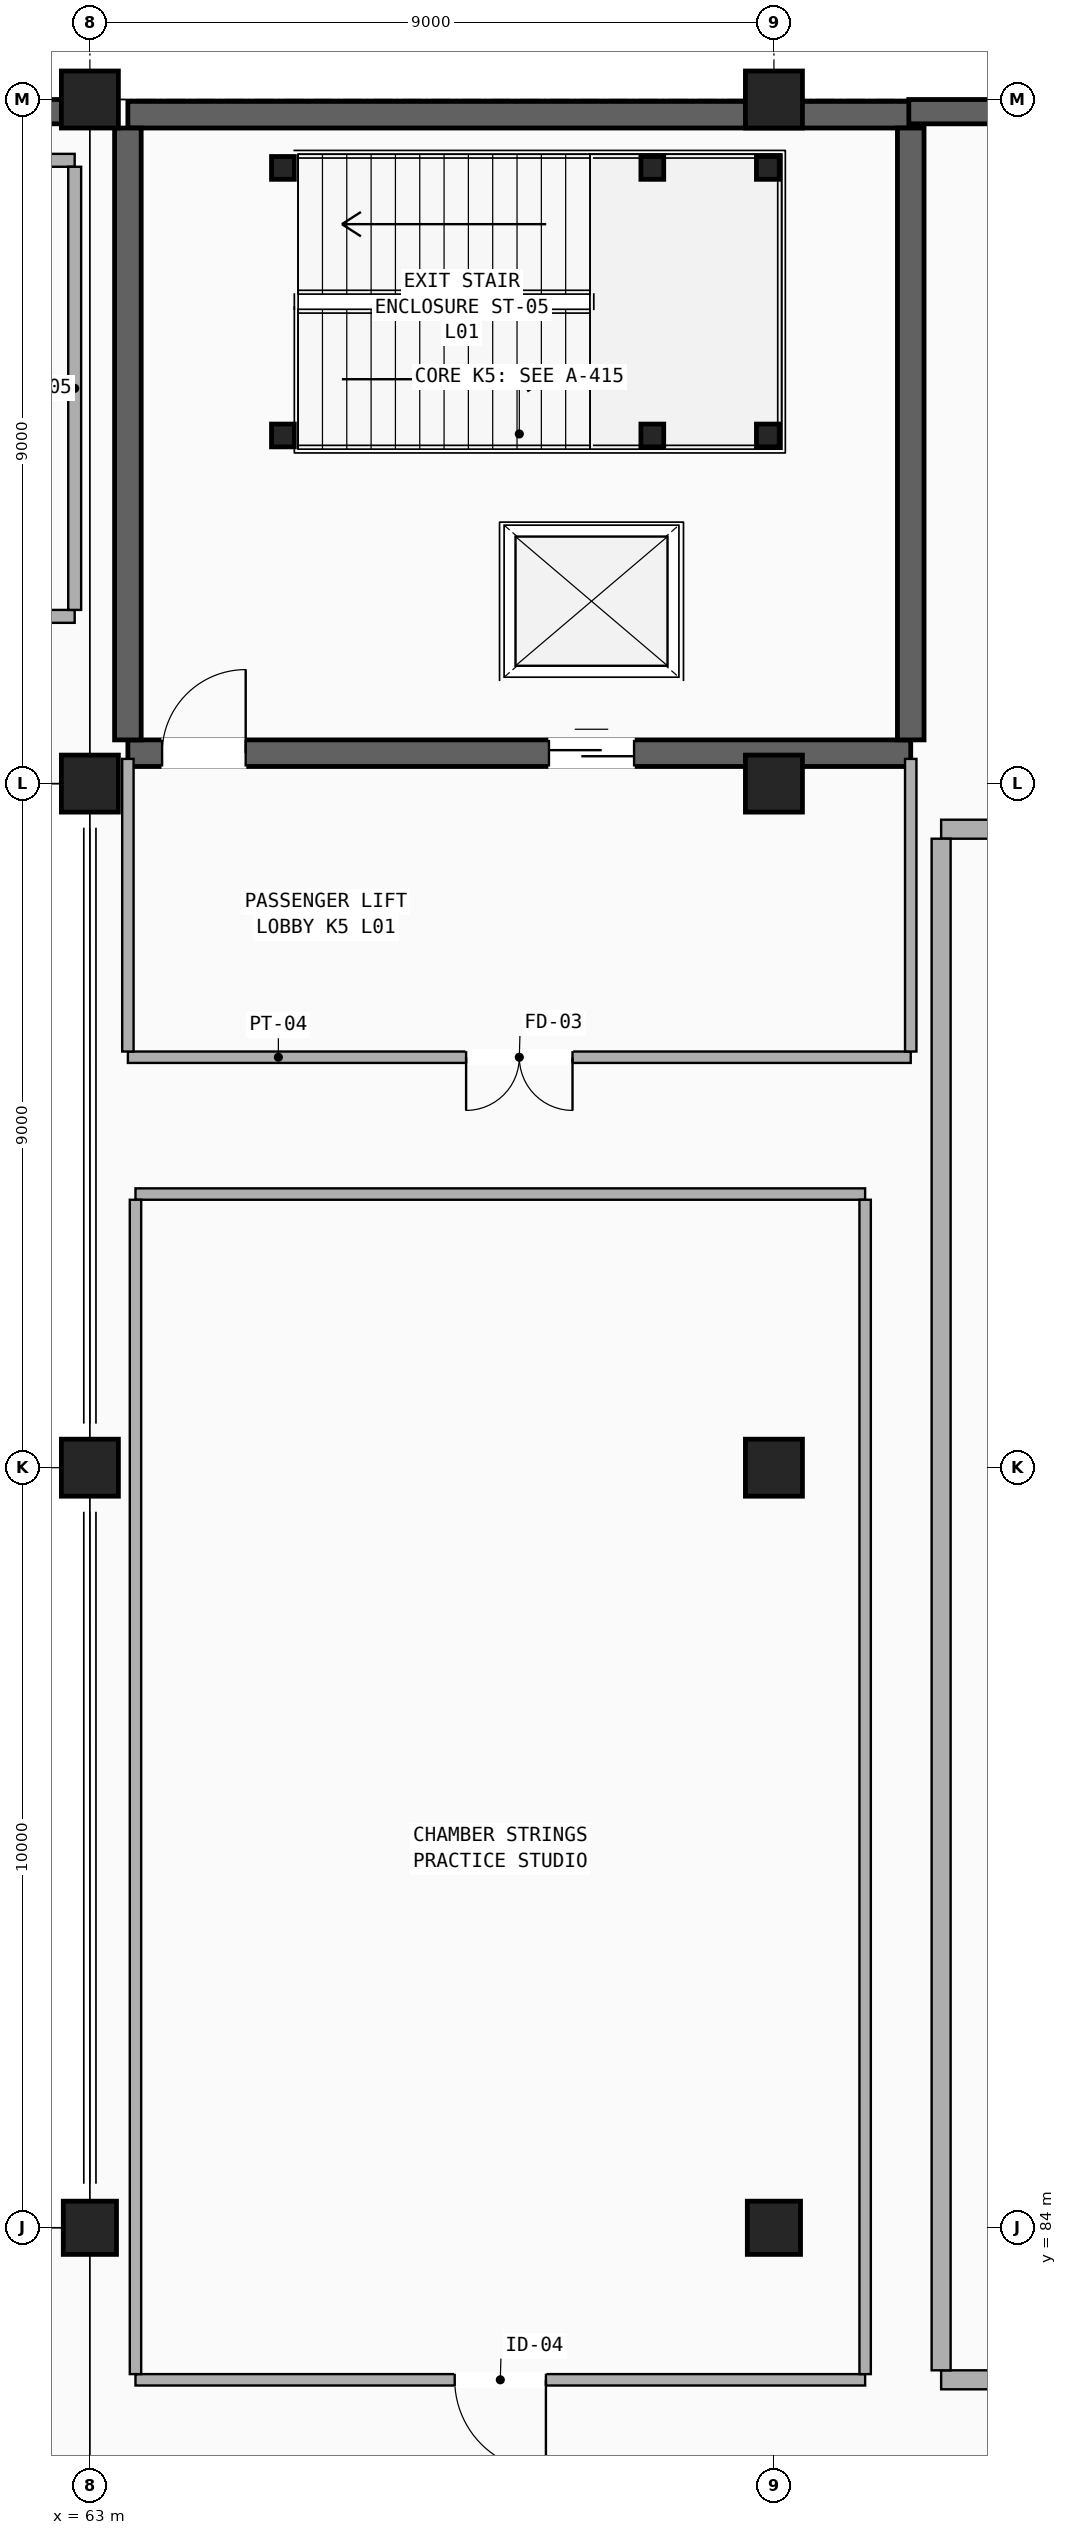
"""IFC4 building model, lengths in metres.
Left out: names, types, materials, properties, quantities, classifications, styles, units other than length and angle.
Written with IfcOpenShell. Run it as: python <this file> out.ifc"""

import sys

from ifc_helpers import new_model, si_unit, direction, frame, frame_2d, origin, origin_2d, place, context, subcontext, project, spatial, rectangle, hollow_rectangle, extrude, element, fill, save


model = new_model("IFC4")
c1 = context("Model", 3, precision=1e-05, world=origin(), true_north=direction((0.0, 1.0)))
c2 = subcontext(c1, "Body", "Model", "MODEL_VIEW")
j1 = project(units=[si_unit("LENGTHUNIT", "METRE"), si_unit("PLANEANGLEUNIT", "RADIAN")], contexts=[c1])
p1 = place(None, origin())
s1 = spatial("IfcSite", under=j1, at=p1, CompositionType="ELEMENT")
p2 = place(p1, origin())
s2 = spatial("IfcBuilding", under=s1, at=p2, CompositionType="ELEMENT")
p3 = place(p2, frame((0.0, 0.0, 5.1)))
s3 = spatial("IfcBuildingStorey", under=s2, at=p3, CompositionType="ELEMENT", Elevation=5.1)
p4 = place(p3, frame((63.0, 84.0, 0.0), z_axis=(0.0, 0.0, 1.0), x_axis=(1.0, 0.0, 0.0)))
e1 = element("IfcColumn", 1, at=p4, inside=s3, PredefinedType="COLUMN", context=c2, shape_type="SweptSolid", body=[
    extrude(rectangle(XDim=0.7, YDim=0.7, at=origin_2d()), origin(), (0.0, 0.0, 1.0), 4.42),
])
for number, where, z_axis, x_axis in (
    (2, (63.0, 94.0, 0.0), (0.0, 0.0, 1.0), (1.0, 0.0, 0.0)),
    (3, (63.0, 103.0, 0.0), (0.0, 0.0, 1.0), (1.0, 0.0, 0.0)),
    (4, (63.0, 112.0, 0.0), (0.0, 0.0, 1.0), (1.0, 0.0, 0.0)),
):
    element("IfcColumn", number, at=place(p3, frame(where, z_axis=z_axis, x_axis=x_axis)), inside=s3, PredefinedType="COLUMN", context=c2, shape_type="SweptSolid", body=[
        extrude(rectangle(XDim=0.75, YDim=0.75, at=origin_2d()), origin(), (0.0, 0.0, 1.0), 4.42),
    ])
p5 = place(p3, frame((72.0, 84.0, 0.0), z_axis=(0.0, 0.0, 1.0), x_axis=(1.0, 0.0, 0.0)))
e5 = element("IfcColumn", 5, at=p5, inside=s3, PredefinedType="COLUMN", context=c2, shape_type="SweptSolid", body=[
    extrude(rectangle(XDim=0.7, YDim=0.7, at=origin_2d()), origin(), (0.0, 0.0, 1.0), 4.42),
])
for number, where, z_axis, x_axis in (
    (6, (72.0, 94.0, 0.0), (0.0, 0.0, 1.0), (1.0, 0.0, 0.0)),
    (7, (72.0, 103.0, 0.0), (0.0, 0.0, 1.0), (1.0, 0.0, 0.0)),
    (8, (72.0, 112.0, 0.0), (0.0, 0.0, 1.0), (1.0, 0.0, 0.0)),
):
    element("IfcColumn", number, at=place(p3, frame(where, z_axis=z_axis, x_axis=x_axis)), inside=s3, PredefinedType="COLUMN", context=c2, shape_type="SweptSolid", body=[
        extrude(rectangle(XDim=0.75, YDim=0.75, at=origin_2d()), origin(), (0.0, 0.0, 1.0), 4.42),
    ])
p6 = place(p3, frame((63.5, 103.4, 0.0), z_axis=(0.0, 0.0, 1.0), x_axis=(1.0, 0.0, 0.0)))
e9 = element("IfcWall", 9, at=p6, inside=s3, PredefinedType="SHEAR", context=c2, shape_type="SweptSolid", body=[
    extrude(rectangle(XDim=10.3, YDim=0.35, at=frame_2d((5.15, 0.0))), origin(), (0.0, 0.0, 1.0), 4.42),
])
p7 = place(p6, frame((0.45, 0.0, 0.0)))
e10 = element("IfcOpeningElement", 10, at=p7, cuts=e9, PredefinedType="OPENING", context=c2, shape_type="SweptSolid", body=[
    extrude(rectangle(XDim=1.1, YDim=2.2, at=frame_2d((0.55, 1.1))), frame((0.0, 0.185, 0.0), z_axis=(0.0, -1.0, 0.0), x_axis=(1.0, 0.0, 0.0)), (0.0, 0.0, 1.0), 0.37),
])
p8 = place(p6, frame((5.54, 0.0, 0.0)))
e11 = element("IfcOpeningElement", 11, at=p8, cuts=e9, PredefinedType="OPENING", context=c2, shape_type="SweptSolid", body=[
    extrude(rectangle(XDim=1.12, YDim=2.16, at=frame_2d((0.56, 1.08))), frame((0.0, 0.185, 0.0), z_axis=(0.0, -1.0, 0.0), x_axis=(1.0, 0.0, 0.0)), (0.0, 0.0, 1.0), 0.37),
])
p9 = place(p3, frame((63.5, 111.8, 0.0), z_axis=(0.0, 0.0, 1.0), x_axis=(1.0, 0.0, 0.0)))
e12 = element("IfcWall", 12, at=p9, inside=s3, PredefinedType="SHEAR", context=c2, shape_type="SweptSolid", body=[
    extrude(rectangle(XDim=10.3, YDim=0.35, at=frame_2d((5.15, 0.0))), origin(), (0.0, 0.0, 1.0), 4.42),
])
for number, where, z_axis, x_axis in (
    (13, (63.5, 103.575, 0.0), (0.0, 0.0, 1.0), (0.0, 1.0, 0.0)),
    (14, (73.8, 103.575, 0.0), (0.0, 0.0, 1.0), (0.0, 1.0, 0.0)),
):
    element("IfcWall", number, at=place(p3, frame(where, z_axis=z_axis, x_axis=x_axis)), inside=s3, PredefinedType="SHEAR", context=c2, shape_type="SweptSolid", body=[
        extrude(rectangle(XDim=8.05, YDim=0.35, at=frame_2d((4.025, 0.0))), origin(), (0.0, 0.0, 1.0), 4.42),
    ])
p10 = place(p3, frame((0.35, 111.84, 0.0), z_axis=(0.0, 0.0, 1.0), x_axis=(1.0, 0.0, 0.0)))
e15 = element("IfcWall", 15, at=p10, inside=s3, PredefinedType="SHEAR", context=c2, shape_type="SweptSolid", body=[
    extrude(rectangle(XDim=62.95, YDim=0.32, at=frame_2d((31.475, 0.0))), origin(), (0.0, 0.0, 1.0), 4.42),
])
p11 = place(p3, frame((73.775, 111.84, 0.0), z_axis=(0.0, 0.0, 1.0), x_axis=(1.0, 0.0, 0.0)))
e16 = element("IfcWall", 16, at=p11, inside=s3, PredefinedType="SHEAR", context=c2, shape_type="SweptSolid", body=[
    extrude(rectangle(XDim=89.875, YDim=0.32, at=frame_2d((44.938, 0.0))), origin(), (0.0, 0.0, 1.0), 4.42),
])
for number, where, z_axis, x_axis in (
    (17, (65.54, 107.58, 0.0), (0.0, 0.0, 1.0), (1.0, 0.0, 0.0)),
    (18, (65.54, 111.1, 0.0), (0.0, 0.0, 1.0), (1.0, 0.0, 0.0)),
    (19, (70.4, 107.58, 0.0), (0.0, 0.0, 1.0), (1.0, 0.0, 0.0)),
    (20, (70.4, 111.1, 0.0), (0.0, 0.0, 1.0), (1.0, 0.0, 0.0)),
    (21, (71.92, 107.58, 0.0), (0.0, 0.0, 1.0), (1.0, 0.0, 0.0)),
    (22, (71.92, 111.1, 0.0), (0.0, 0.0, 1.0), (1.0, 0.0, 0.0)),
):
    element("IfcColumn", number, at=place(p3, frame(where, z_axis=z_axis, x_axis=x_axis)), inside=s3, PredefinedType="COLUMN", context=c2, shape_type="SweptSolid", body=[
        extrude(hollow_rectangle(XDim=0.3, YDim=0.3, WallThickness=0.016, InnerFilletRadius=0.016, OuterFilletRadius=0.032, at=origin_2d()), origin(), (0.0, 0.0, 1.0), 4.42),
    ])
p12 = place(p3, frame((63.5, 99.4, 0.0), z_axis=(0.0, 0.0, 1.0), x_axis=(1.0, 0.0, 0.0)))
e23 = element("IfcWall", 23, at=p12, inside=s3, PredefinedType="PARTITIONING", context=c2, shape_type="SweptSolid", body=[
    extrude(rectangle(XDim=10.3, YDim=0.15, at=frame_2d((5.15, 0.0))), origin(), (0.0, 0.0, 1.0), 3.46),
])
p13 = place(p12, frame((4.45, 0.0, 0.0)))
e24 = element("IfcOpeningElement", 24, at=p13, cuts=e23, PredefinedType="OPENING", context=c2, shape_type="SweptSolid", body=[
    extrude(rectangle(XDim=1.4, YDim=2.2, at=frame_2d((0.7, 1.1))), frame((0.0, 0.085, 0.0), z_axis=(0.0, -1.0, 0.0), x_axis=(1.0, 0.0, 0.0)), (0.0, 0.0, 1.0), 0.17),
])
p14 = place(p3, frame((63.5, 99.475, 0.0), z_axis=(0.0, 0.0, 1.0), x_axis=(0.0, 1.0, 0.0)))
e25 = element("IfcWall", 25, at=p14, inside=s3, PredefinedType="PARTITIONING", context=c2, shape_type="SweptSolid", body=[
    extrude(rectangle(XDim=3.85, YDim=0.15, at=frame_2d((1.925, 0.0))), origin(), (0.0, 0.0, 1.0), 3.29),
])
p15 = place(p3, frame((73.8, 99.475, 0.0), z_axis=(0.0, 0.0, 1.0), x_axis=(0.0, 1.0, 0.0)))
e26 = element("IfcWall", 26, at=p15, inside=s3, PredefinedType="PARTITIONING", context=c2, shape_type="SweptSolid", body=[
    extrude(rectangle(XDim=3.85, YDim=0.15, at=frame_2d((1.925, 0.0))), origin(), (0.0, 0.0, 1.0), 3.39),
])
p16 = place(p3, frame((74.2, 82.0, 0.0), z_axis=(0.0, 0.0, 1.0), x_axis=(1.0, 0.0, 0.0)))
e27 = element("IfcWall", 27, at=p16, inside=s3, PredefinedType="PARTITIONING", context=c2, shape_type="SweptSolid", body=[
    extrude(rectangle(XDim=33.0, YDim=0.25, at=frame_2d((16.5, 0.0))), origin(), (0.0, 0.0, 1.0), 3.46),
])
p17 = place(p16, frame((13.323, 0.0, 0.0)))
e28 = element("IfcOpeningElement", 28, at=p17, cuts=e27, PredefinedType="OPENING", context=c2, shape_type="SweptSolid", body=[
    extrude(rectangle(XDim=1.8, YDim=2.3, at=frame_2d((0.9, 1.15))), frame((0.0, 0.135, 0.0), z_axis=(0.0, -1.0, 0.0), x_axis=(1.0, 0.0, 0.0)), (0.0, 0.0, 1.0), 0.27),
])
p18 = place(p16, frame((22.62, 0.0, 0.0)))
e29 = element("IfcOpeningElement", 29, at=p18, cuts=e27, PredefinedType="OPENING", context=c2, shape_type="SweptSolid", body=[
    extrude(rectangle(XDim=1.8, YDim=2.3, at=frame_2d((0.9, 1.15))), frame((0.0, 0.135, 0.0), z_axis=(0.0, -1.0, 0.0), x_axis=(1.0, 0.0, 0.0)), (0.0, 0.0, 1.0), 0.27),
])
p19 = place(p3, frame((74.2, 102.4, 0.0), z_axis=(0.0, 0.0, 1.0), x_axis=(1.0, 0.0, 0.0)))
e30 = element("IfcWall", 30, at=p19, inside=s3, PredefinedType="PARTITIONING", context=c2, shape_type="SweptSolid", body=[
    extrude(rectangle(XDim=33.0, YDim=0.25, at=frame_2d((16.5, 0.0))), origin(), (0.0, 0.0, 1.0), 3.29),
])
p20 = place(p3, frame((74.2, 82.125, 0.0), z_axis=(0.0, 0.0, 1.0), x_axis=(0.0, 1.0, 0.0)))
e31 = element("IfcWall", 31, at=p20, inside=s3, PredefinedType="PARTITIONING", context=c2, shape_type="SweptSolid", body=[
    extrude(rectangle(XDim=20.15, YDim=0.25, at=frame_2d((10.075, 0.0))), origin(), (0.0, 0.0, 1.0), 3.24),
])
p21 = place(p3, frame((36.6, 105.2, 0.0), z_axis=(0.0, 0.0, 1.0), x_axis=(1.0, 0.0, 0.0)))
e32 = element("IfcWall", 32, at=p21, inside=s3, PredefinedType="PARTITIONING", context=c2, shape_type="SweptSolid", body=[
    extrude(rectangle(XDim=26.2, YDim=0.17, at=frame_2d((13.1, 0.0))), origin(), (0.0, 0.0, 1.0), 3.29),
])
p22 = place(p21, frame((12.55, 0.0, 0.0)))
e33 = element("IfcOpeningElement", 33, at=p22, cuts=e32, PredefinedType="OPENING", context=c2, shape_type="SweptSolid", body=[
    extrude(rectangle(XDim=1.1, YDim=2.2, at=frame_2d((0.55, 1.1))), frame((0.0, 0.095, 0.0), z_axis=(0.0, -1.0, 0.0), x_axis=(1.0, 0.0, 0.0)), (0.0, 0.0, 1.0), 0.19),
])
p23 = place(p21, frame((5.764, 0.0, 0.0)))
e34 = element("IfcOpeningElement", 34, at=p23, cuts=e32, PredefinedType="OPENING", context=c2, shape_type="SweptSolid", body=[
    extrude(rectangle(XDim=1.1, YDim=2.2, at=frame_2d((0.55, 1.1))), frame((0.0, 0.095, 0.0), z_axis=(0.0, -1.0, 0.0), x_axis=(1.0, 0.0, 0.0)), (0.0, 0.0, 1.0), 0.19),
])
p24 = place(p3, frame((36.6, 111.2, 0.0), z_axis=(0.0, 0.0, 1.0), x_axis=(1.0, 0.0, 0.0)))
e35 = element("IfcWall", 35, at=p24, inside=s3, PredefinedType="PARTITIONING", context=c2, shape_type="SweptSolid", body=[
    extrude(rectangle(XDim=26.2, YDim=0.17, at=frame_2d((13.1, 0.0))), origin(), (0.0, 0.0, 1.0), 3.29),
])
p25 = place(p3, frame((62.8, 105.285, 0.0), z_axis=(0.0, 0.0, 1.0), x_axis=(0.0, 1.0, 0.0)))
e36 = element("IfcWall", 36, at=p25, inside=s3, PredefinedType="PARTITIONING", context=c2, shape_type="SweptSolid", body=[
    extrude(rectangle(XDim=5.83, YDim=0.17, at=frame_2d((2.915, 0.0))), origin(), (0.0, 0.0, 1.0), 3.29),
])
p26 = place(p3, frame((63.6, 82.0, 0.0), z_axis=(0.0, 0.0, 1.0), x_axis=(1.0, 0.0, 0.0)))
e37 = element("IfcWall", 37, at=p26, inside=s3, PredefinedType="PARTITIONING", context=c2, shape_type="SweptSolid", body=[
    extrude(rectangle(XDim=9.6, YDim=0.15, at=frame_2d((4.8, 0.0))), origin(), (0.0, 0.0, 1.0), 3.29),
])
p27 = place(p26, frame((4.2, 0.0, 0.0)))
e38 = element("IfcOpeningElement", 38, at=p27, cuts=e37, PredefinedType="OPENING", context=c2, shape_type="SweptSolid", body=[
    extrude(rectangle(XDim=1.2, YDim=2.2, at=frame_2d((0.6, 1.1))), frame((0.0, 0.085, 0.0), z_axis=(0.0, -1.0, 0.0), x_axis=(1.0, 0.0, 0.0)), (0.0, 0.0, 1.0), 0.17),
])
p28 = place(p3, frame((63.6, 97.6, 0.0), z_axis=(0.0, 0.0, 1.0), x_axis=(1.0, 0.0, 0.0)))
e39 = element("IfcWall", 39, at=p28, inside=s3, PredefinedType="PARTITIONING", context=c2, shape_type="SweptSolid", body=[
    extrude(rectangle(XDim=9.6, YDim=0.15, at=frame_2d((4.8, 0.0))), origin(), (0.0, 0.0, 1.0), 3.46),
])
p29 = place(p3, frame((63.6, 82.075, 0.0), z_axis=(0.0, 0.0, 1.0), x_axis=(0.0, 1.0, 0.0)))
e40 = element("IfcWall", 40, at=p29, inside=s3, PredefinedType="PARTITIONING", context=c2, shape_type="SweptSolid", body=[
    extrude(rectangle(XDim=15.45, YDim=0.15, at=frame_2d((7.725, 0.0))), origin(), (0.0, 0.0, 1.0), 3.14),
])
p30 = place(p3, frame((73.2, 82.075, 0.0), z_axis=(0.0, 0.0, 1.0), x_axis=(0.0, 1.0, 0.0)))
e41 = element("IfcWall", 41, at=p30, inside=s3, PredefinedType="PARTITIONING", context=c2, shape_type="SweptSolid", body=[
    extrude(rectangle(XDim=15.45, YDim=0.15, at=frame_2d((7.725, 0.0))), origin(), (0.0, 0.0, 1.0), 3.24),
])
p31 = place(p7, origin())
e42 = element("IfcDoor", 42, at=p31, inside=s3, OperationType="SINGLE_SWING_RIGHT", PredefinedType="DOOR", context=c2, shape_type="SweptSolid", body=[
    extrude(rectangle(XDim=1.1, YDim=2.2, at=frame_2d((0.55, 1.1))), frame((0.0, 0.025, 0.0), z_axis=(0.0, -1.0, 0.0), x_axis=(1.0, 0.0, 0.0)), (0.0, 0.0, 1.0), 0.05),
])
fill(e10, e42)
p32 = place(p8, origin())
e43 = element("IfcDoor", 43, at=p32, inside=s3, OperationType="SLIDING_TO_LEFT", PredefinedType="DOOR", context=c2, shape_type="SweptSolid", body=[
    extrude(rectangle(XDim=1.12, YDim=2.16, at=frame_2d((0.56, 1.08))), frame((0.0, 0.025, 0.0), z_axis=(0.0, -1.0, 0.0), x_axis=(1.0, 0.0, 0.0)), (0.0, 0.0, 1.0), 0.05),
])
fill(e11, e43)
p33 = place(p13, frame((1.4, 0.0, 0.0), z_axis=(0.0, 0.0, 1.0), x_axis=(-1.0, 0.0, 0.0)))
e44 = element("IfcDoor", 44, at=p33, inside=s3, OperationType="DOUBLE_DOOR_SINGLE_SWING", PredefinedType="DOOR", context=c2, shape_type="SweptSolid", body=[
    extrude(rectangle(XDim=1.4, YDim=2.2, at=frame_2d((0.7, 1.1))), frame((0.0, 0.025, 0.0), z_axis=(0.0, -1.0, 0.0), x_axis=(1.0, 0.0, 0.0)), (0.0, 0.0, 1.0), 0.05),
])
fill(e24, e44)
p34 = place(p27, frame((1.2, 0.0, 0.0), z_axis=(0.0, 0.0, 1.0), x_axis=(-1.0, 0.0, 0.0)))
e45 = element("IfcDoor", 45, at=p34, inside=s3, OperationType="SINGLE_SWING_LEFT", PredefinedType="DOOR", context=c2, shape_type="SweptSolid", body=[
    extrude(rectangle(XDim=1.2, YDim=2.2, at=frame_2d((0.6, 1.1))), frame((0.0, 0.025, 0.0), z_axis=(0.0, -1.0, 0.0), x_axis=(1.0, 0.0, 0.0)), (0.0, 0.0, 1.0), 0.05),
])
fill(e38, e45)
save(model, sys.argv[1])
